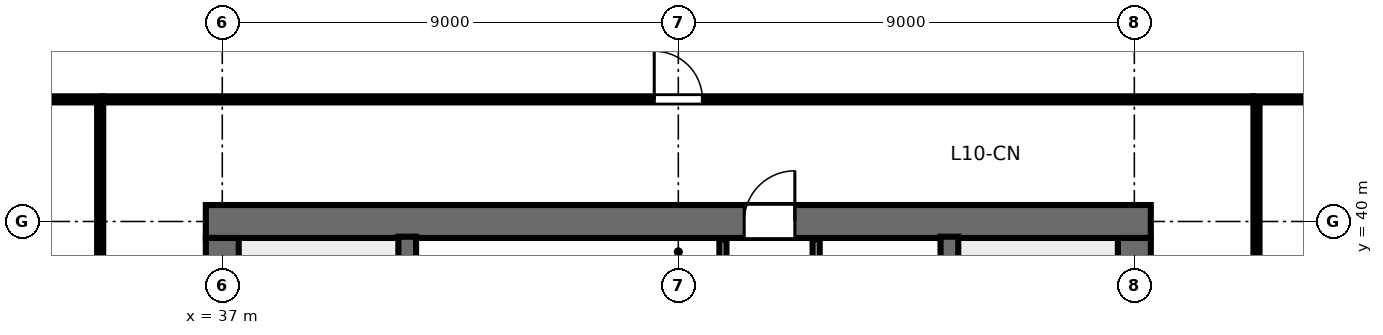
"""IFC4 building model, lengths in metres.
Left out: names, types, materials, properties, quantities, classifications, styles, units other than length and angle.
Written with IfcOpenShell. Run it as: python <this file> out.ifc"""

import sys

from ifc_helpers import new_model, si_unit, direction, frame, frame_2d, origin, place, context, subcontext, project, spatial, rectangle, extrude, element, fill, save


model = new_model("IFC4")
c1 = context("Model", 3, precision=1e-05, world=origin(), true_north=direction((0.0, 1.0)))
c2 = subcontext(c1, "Body", "Model", "MODEL_VIEW")
j1 = project(units=[si_unit("LENGTHUNIT", "METRE"), si_unit("PLANEANGLEUNIT", "RADIAN")], contexts=[c1])
p1 = place(None, origin())
s1 = spatial("IfcSite", under=j1, at=p1, CompositionType="ELEMENT")
p2 = place(p1, origin())
s2 = spatial("IfcBuilding", under=s1, at=p2, CompositionType="ELEMENT")
p3 = place(p2, frame((0.0, 0.0, 42.4)))
s3 = spatial("IfcBuildingStorey", under=s2, at=p3, CompositionType="ELEMENT", Elevation=42.4)
p4 = place(p3, frame((36.675, 40.0, 0.0), z_axis=(0.0, 0.0, 1.0), x_axis=(1.0, 0.0, 0.0)))
e1 = element("IfcWall", 1, at=p4, inside=s3, PredefinedType="SHEAR", context=c2, shape_type="SweptSolid", body=[
    extrude(rectangle(XDim=18.65, YDim=0.65, at=frame_2d((9.325, 0.0))), origin(), (0.0, 0.0, 1.0), 3.36),
])
p5 = place(p4, frame((10.625, 0.0, 0.0)))
e2 = element("IfcOpeningElement", 2, at=p5, cuts=e1, PredefinedType="OPENING", context=c2, shape_type="SweptSolid", body=[
    extrude(rectangle(XDim=1.0, YDim=2.15, at=frame_2d((0.5, 1.075))), frame((0.0, 0.335, 0.0), z_axis=(0.0, -1.0, 0.0), x_axis=(1.0, 0.0, 0.0)), (0.0, 0.0, 1.0), 0.67),
])
p6 = place(p3, frame((37.0, 24.325, 0.0), z_axis=(0.0, 0.0, 1.0), x_axis=(0.0, 1.0, 0.0)))
e3 = element("IfcWall", 3, at=p6, inside=s3, PredefinedType="SHEAR", context=c2, shape_type="SweptSolid", body=[
    extrude(rectangle(XDim=15.35, YDim=0.65, at=frame_2d((7.675, 0.0))), origin(), (0.0, 0.0, 1.0), 3.36),
])
p7 = place(p6, frame((5.2, 0.0, 0.0)))
e4 = element("IfcOpeningElement", 4, at=p7, cuts=e3, PredefinedType="OPENING", context=c2, shape_type="SweptSolid", body=[
    extrude(rectangle(XDim=1.15, YDim=2.15, at=frame_2d((0.575, 1.075))), frame((0.0, 0.335, 0.0), z_axis=(0.0, -1.0, 0.0), x_axis=(1.0, 0.0, 0.0)), (0.0, 0.0, 1.0), 0.67),
])
p8 = place(p3, frame((55.0, 24.325, 0.0), z_axis=(0.0, 0.0, 1.0), x_axis=(0.0, 1.0, 0.0)))
e5 = element("IfcWall", 5, at=p8, inside=s3, PredefinedType="SHEAR", context=c2, shape_type="SweptSolid", body=[
    extrude(rectangle(XDim=15.35, YDim=0.65, at=frame_2d((7.675, 0.0))), origin(), (0.0, 0.0, 1.0), 3.36),
])
p9 = place(p8, frame((5.2, 0.0, 0.0)))
e6 = element("IfcOpeningElement", 6, at=p9, cuts=e5, PredefinedType="OPENING", context=c2, shape_type="SweptSolid", body=[
    extrude(rectangle(XDim=1.15, YDim=2.15, at=frame_2d((0.575, 1.075))), frame((0.0, 0.335, 0.0), z_axis=(0.0, -1.0, 0.0), x_axis=(1.0, 0.0, 0.0)), (0.0, 0.0, 1.0), 0.67),
])
for number, where, z_axis, x_axis in (
    (7, (40.65, 32.0, 0.0), (0.0, 0.0, 1.0), (0.0, 1.0, 0.0)),
    (8, (51.35, 32.0, 0.0), (0.0, 0.0, 1.0), (0.0, 1.0, 0.0)),
):
    element("IfcWall", number, at=place(p3, frame(where, z_axis=z_axis, x_axis=x_axis)), inside=s3, PredefinedType="SHEAR", context=c2, shape_type="SweptSolid", body=[
        extrude(rectangle(XDim=7.7, YDim=0.35, at=frame_2d((3.85, 0.0))), origin(), (0.0, 0.0, 1.0), 3.6),
    ])
p10 = place(p3, frame((46.88, 32.05, 0.0), z_axis=(0.0, 0.0, 1.0), x_axis=(0.0, 1.0, 0.0)))
e9 = element("IfcWall", 9, at=p10, inside=s3, PredefinedType="PARTITIONING", context=c2, shape_type="SweptSolid", body=[
    extrude(rectangle(XDim=7.6, YDim=0.14, at=frame_2d((3.8, 0.0))), origin(), (0.0, 0.0, 1.0), 3.15),
])
p11 = place(p10, frame((3.4, 0.0, 0.0)))
e10 = element("IfcOpeningElement", 10, at=p11, cuts=e9, PredefinedType="OPENING", context=c2, shape_type="SweptSolid", body=[
    extrude(rectangle(XDim=0.95, YDim=2.15, at=frame_2d((0.475, 1.075))), frame((0.0, 0.08, 0.0), z_axis=(0.0, -1.0, 0.0), x_axis=(1.0, 0.0, 0.0)), (0.0, 0.0, 1.0), 0.16),
])
p12 = place(p3, frame((48.72, 32.05, 0.0), z_axis=(0.0, 0.0, 1.0), x_axis=(0.0, 1.0, 0.0)))
e11 = element("IfcWall", 11, at=p12, inside=s3, PredefinedType="PARTITIONING", context=c2, shape_type="SweptSolid", body=[
    extrude(rectangle(XDim=7.6, YDim=0.14, at=frame_2d((3.8, 0.0))), origin(), (0.0, 0.0, 1.0), 3.15),
])
p13 = place(p12, frame((0.8, 0.0, 0.0)))
e12 = element("IfcOpeningElement", 12, at=p13, cuts=e11, PredefinedType="OPENING", context=c2, shape_type="SweptSolid", body=[
    extrude(rectangle(XDim=0.9, YDim=2.15, at=frame_2d((0.45, 1.075))), frame((0.0, 0.08, 0.0), z_axis=(0.0, -1.0, 0.0), x_axis=(1.0, 0.0, 0.0)), (0.0, 0.0, 1.0), 0.16),
])
p14 = place(p12, frame((3.35, 0.0, 0.0)))
e13 = element("IfcOpeningElement", 13, at=p14, cuts=e11, PredefinedType="OPENING", context=c2, shape_type="SweptSolid", body=[
    extrude(rectangle(XDim=0.9, YDim=2.15, at=frame_2d((0.45, 1.075))), frame((0.0, 0.08, 0.0), z_axis=(0.0, -1.0, 0.0), x_axis=(1.0, 0.0, 0.0)), (0.0, 0.0, 1.0), 0.16),
])
p15 = place(p12, frame((5.9, 0.0, 0.0)))
e14 = element("IfcOpeningElement", 14, at=p15, cuts=e11, PredefinedType="OPENING", context=c2, shape_type="SweptSolid", body=[
    extrude(rectangle(XDim=0.92, YDim=2.15, at=frame_2d((0.46, 1.075))), frame((0.0, 0.08, 0.0), z_axis=(0.0, -1.0, 0.0), x_axis=(1.0, 0.0, 0.0)), (0.0, 0.0, 1.0), 0.16),
])
p16 = place(p3, frame((34.65, 42.41, 0.0), z_axis=(0.0, 0.0, 1.0), x_axis=(1.0, 0.0, 0.0)))
e15 = element("IfcWall", 15, at=p16, inside=s3, PredefinedType="PARTITIONING", context=c2, shape_type="SweptSolid", body=[
    extrude(rectangle(XDim=22.7, YDim=0.12, at=frame_2d((11.35, 0.0))), origin(), (0.0, 0.0, 1.0), 2.43),
])
p17 = place(p16, frame((10.875, 0.0, 0.0)))
e16 = element("IfcOpeningElement", 16, at=p17, cuts=e15, PredefinedType="OPENING", context=c2, shape_type="SweptSolid", body=[
    extrude(rectangle(XDim=0.95, YDim=2.15, at=frame_2d((0.475, 1.075))), frame((0.0, 0.07, 0.0), z_axis=(0.0, -1.0, 0.0), x_axis=(1.0, 0.0, 0.0)), (0.0, 0.0, 1.0), 0.14),
])
p18 = place(p3, frame((34.59, 21.65, 0.0), z_axis=(0.0, 0.0, 1.0), x_axis=(0.0, 1.0, 0.0)))
e17 = element("IfcWall", 17, at=p18, inside=s3, PredefinedType="PARTITIONING", context=c2, shape_type="SweptSolid", body=[
    extrude(rectangle(XDim=20.7, YDim=0.12, at=frame_2d((10.35, 0.0))), origin(), (0.0, 0.0, 1.0), 2.43),
])
p19 = place(p18, frame((3.402, 0.0, 0.0)))
e18 = element("IfcOpeningElement", 18, at=p19, cuts=e17, PredefinedType="OPENING", context=c2, shape_type="SweptSolid", body=[
    extrude(rectangle(XDim=0.95, YDim=2.15, at=frame_2d((0.475, 1.075))), frame((0.0, 0.07, 0.0), z_axis=(0.0, -1.0, 0.0), x_axis=(1.0, 0.0, 0.0)), (0.0, 0.0, 1.0), 0.14),
])
p20 = place(p18, frame((9.912, 0.0, 0.0)))
e19 = element("IfcOpeningElement", 19, at=p20, cuts=e17, PredefinedType="OPENING", context=c2, shape_type="SweptSolid", body=[
    extrude(rectangle(XDim=0.95, YDim=2.15, at=frame_2d((0.475, 1.075))), frame((0.0, 0.07, 0.0), z_axis=(0.0, -1.0, 0.0), x_axis=(1.0, 0.0, 0.0)), (0.0, 0.0, 1.0), 0.14),
])
p21 = place(p18, frame((16.385, 0.0, 0.0)))
e20 = element("IfcOpeningElement", 20, at=p21, cuts=e17, PredefinedType="OPENING", context=c2, shape_type="SweptSolid", body=[
    extrude(rectangle(XDim=0.95, YDim=2.15, at=frame_2d((0.475, 1.075))), frame((0.0, 0.07, 0.0), z_axis=(0.0, -1.0, 0.0), x_axis=(1.0, 0.0, 0.0)), (0.0, 0.0, 1.0), 0.14),
])
p22 = place(p3, frame((57.41, 21.65, 0.0), z_axis=(0.0, 0.0, 1.0), x_axis=(0.0, 1.0, 0.0)))
e21 = element("IfcWall", 21, at=p22, inside=s3, PredefinedType="PARTITIONING", context=c2, shape_type="SweptSolid", body=[
    extrude(rectangle(XDim=20.7, YDim=0.12, at=frame_2d((10.35, 0.0))), origin(), (0.0, 0.0, 1.0), 2.43),
])
p23 = place(p22, frame((9.875, 0.0, 0.0)))
e22 = element("IfcOpeningElement", 22, at=p23, cuts=e21, PredefinedType="OPENING", context=c2, shape_type="SweptSolid", body=[
    extrude(rectangle(XDim=0.95, YDim=2.15, at=frame_2d((0.475, 1.075))), frame((0.0, 0.07, 0.0), z_axis=(0.0, -1.0, 0.0), x_axis=(1.0, 0.0, 0.0)), (0.0, 0.0, 1.0), 0.14),
])
for number, where, z_axis, x_axis in (
    (23, (34.65, 42.41, 0.0), (0.0, 0.0, 1.0), (-1.0, 0.0, 0.0)),
    (24, (57.35, 42.41, 0.0), (0.0, 0.0, 1.0), (1.0, 0.0, 0.0)),
):
    element("IfcWall", number, at=place(p3, frame(where, z_axis=z_axis, x_axis=x_axis)), inside=s3, PredefinedType="PARTITIONING", context=c2, shape_type="SweptSolid", body=[
        extrude(rectangle(XDim=12.42, YDim=0.12, at=frame_2d((6.21, 0.0))), origin(), (0.0, 0.0, 1.0), 2.43),
    ])
p24 = place(p5, origin())
e25 = element("IfcDoor", 25, at=p24, inside=s3, OperationType="SINGLE_SWING_RIGHT", PredefinedType="DOOR", context=c2, shape_type="SweptSolid", body=[
    extrude(rectangle(XDim=1.0, YDim=2.15, at=frame_2d((0.5, 1.075))), frame((0.0, 0.025, 0.0), z_axis=(0.0, -1.0, 0.0), x_axis=(1.0, 0.0, 0.0)), (0.0, 0.0, 1.0), 0.05),
])
fill(e2, e25)
p25 = place(p17, origin())
e26 = element("IfcDoor", 26, at=p25, inside=s3, OperationType="SINGLE_SWING_LEFT", PredefinedType="DOOR", context=c2, shape_type="SweptSolid", body=[
    extrude(rectangle(XDim=0.95, YDim=2.15, at=frame_2d((0.475, 1.075))), frame((0.0, 0.025, 0.0), z_axis=(0.0, -1.0, 0.0), x_axis=(1.0, 0.0, 0.0)), (0.0, 0.0, 1.0), 0.05),
])
fill(e16, e26)
save(model, sys.argv[1])
